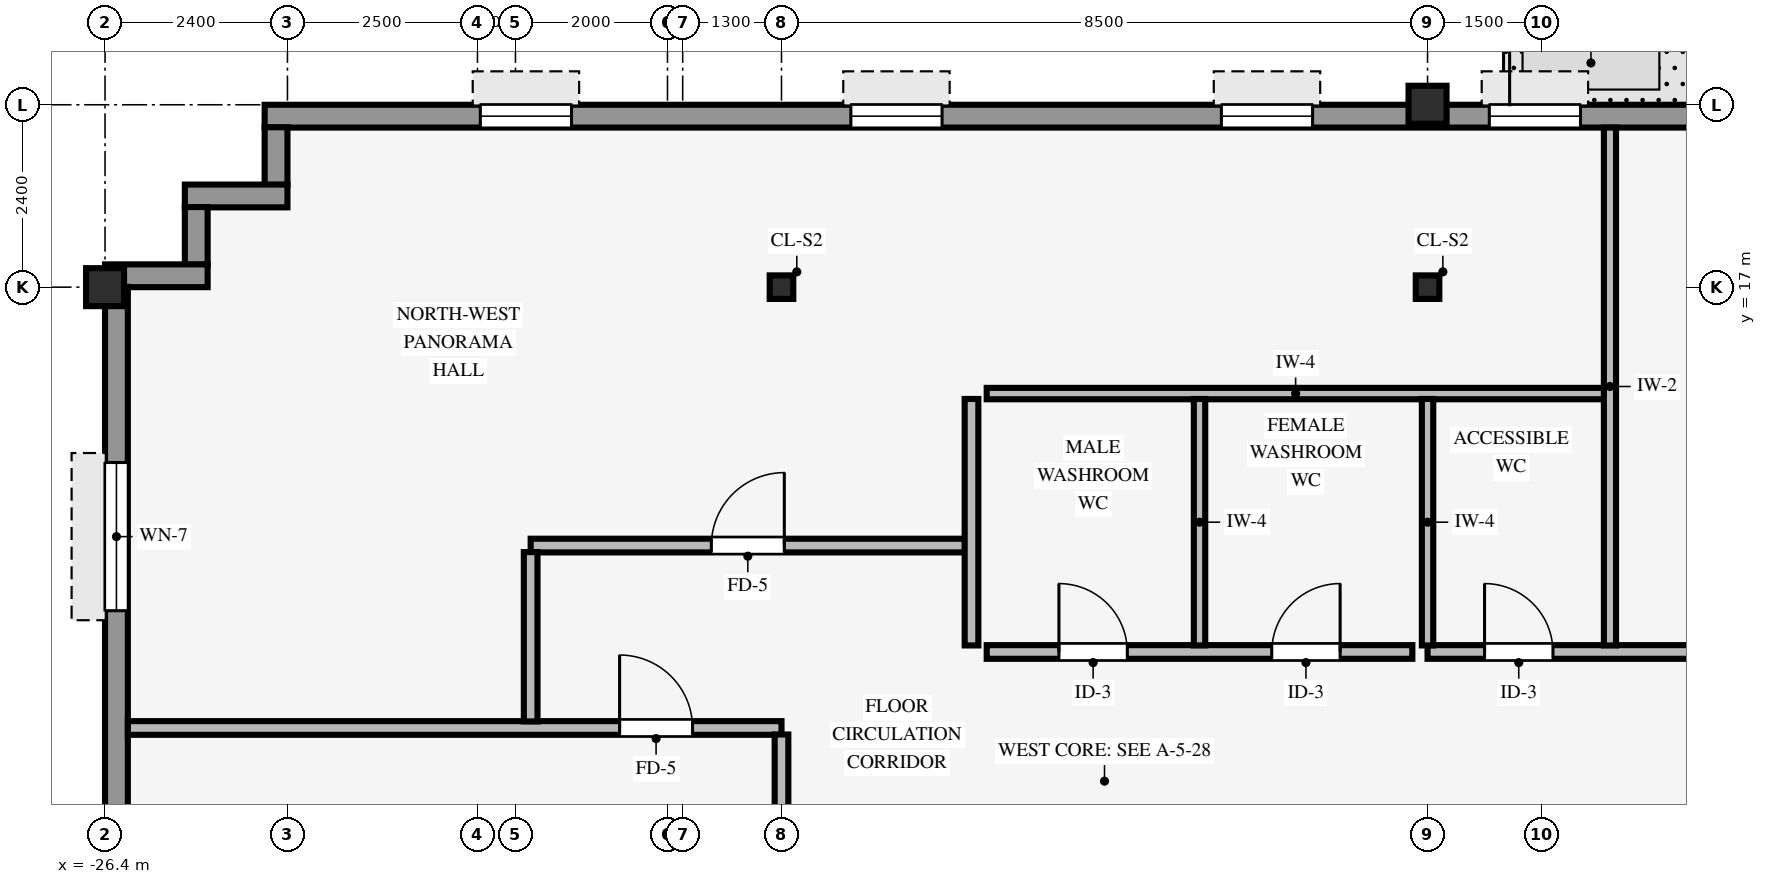
"""IFC4 building model, lengths in metres.
Left out: names, types, materials, properties, quantities, classifications, styles, units other than length and angle.
Written with IfcOpenShell. Run it as: python <this file> out.ifc"""

import sys

from ifc_helpers import new_model, si_unit, direction, frame, frame_2d, origin, origin_2d, place, context, subcontext, project, spatial, rectangle, hollow_rectangle, i_section, extrude, source, transform, mapped, element, fill, save


model = new_model("IFC4")
c1 = context("Model", 3, precision=1e-05, world=origin(), true_north=direction((0.0, 1.0)))
c2 = subcontext(c1, "Body", "Model", "MODEL_VIEW")
j1 = project(units=[si_unit("LENGTHUNIT", "METRE"), si_unit("PLANEANGLEUNIT", "RADIAN")], contexts=[c1])
p1 = place(None, origin())
s1 = spatial("IfcSite", under=j1, at=p1, CompositionType="ELEMENT")
p2 = place(p1, origin())
s2 = spatial("IfcBuilding", under=s1, at=p2, CompositionType="ELEMENT")
p3 = place(p2, frame((0.0, 0.0, 238.35)))
s3 = spatial("IfcBuildingStorey", under=s2, at=p3, CompositionType="ELEMENT", Elevation=238.35)
for number, where, z_axis, x_axis in (
    (1, (-26.4, 17.0, 0.0), (0.0, 0.0, 1.0), (1.0, 0.0, 0.0)),
    (2, (-9.0, 19.4, 0.0), (0.0, 0.0, 1.0), (1.0, 0.0, 0.0)),
):
    element("IfcColumn", number, at=place(p3, frame(where, z_axis=z_axis, x_axis=x_axis)), inside=s3, PredefinedType="COLUMN", context=c2, shape_type="SweptSolid", body=[
        extrude(hollow_rectangle(XDim=0.5, YDim=0.5, WallThickness=0.032, InnerFilletRadius=0.032, OuterFilletRadius=0.064, at=origin_2d()), origin(), (0.0, 0.0, 1.0), 3.37),
    ])
for number, where, z_axis, x_axis in (
    (3, (-17.5, 17.0, 0.0), (0.0, 0.0, 1.0), (1.0, 0.0, 0.0)),
    (4, (-9.0, 17.0, 0.0), (0.0, 0.0, 1.0), (1.0, 0.0, 0.0)),
):
    element("IfcColumn", number, at=place(p3, frame(where, z_axis=z_axis, x_axis=x_axis)), inside=s3, PredefinedType="COLUMN", context=c2, shape_type="SweptSolid", body=[
        extrude(i_section(OverallWidth=0.31, OverallDepth=0.31, WebThickness=0.015, FlangeThickness=0.015, FilletRadius=0.015, at=origin_2d()), origin(), (0.0, 0.0, 1.0), 3.37),
    ])
p4 = place(p3, frame((-24.3, 19.25, 0.0), z_axis=(0.0, 0.0, 1.0), x_axis=(1.0, 0.0, 0.0)))
e5 = element("IfcWall", 5, at=p4, inside=s3, PredefinedType="STANDARD", context=c2, shape_type="SweptSolid", body=[
    extrude(rectangle(XDim=41.0, YDim=0.3, at=frame_2d((20.5, 0.0))), origin(), (0.0, 0.0, 1.0), 2.705),
])
p5 = place(p4, frame((18.9, 0.0, 0.0)))
e6 = element("IfcOpeningElement", 6, at=p5, cuts=e5, PredefinedType="OPENING", context=c2, shape_type="SweptSolid", body=[
    extrude(rectangle(XDim=1.05, YDim=2.1, at=frame_2d((0.525, 1.05))), frame((0.0, 0.16, 0.0), z_axis=(0.0, -1.0, 0.0), x_axis=(1.0, 0.0, 0.0)), (0.0, 0.0, 1.0), 0.32),
])
p6 = place(p4, frame((2.837, 0.0, 0.8)))
e7 = element("IfcOpeningElement", 7, at=p6, cuts=e5, PredefinedType="OPENING", context=c2, shape_type="SweptSolid", body=[
    extrude(rectangle(XDim=1.2, YDim=1.48, at=frame_2d((0.6, 0.74))), frame((0.0, 0.16, 0.0), z_axis=(0.0, -1.0, 0.0), x_axis=(1.0, 0.0, 0.0)), (0.0, 0.0, 1.0), 0.32),
])
p7 = place(p4, frame((7.712, 0.0, 0.8)))
e8 = element("IfcOpeningElement", 8, at=p7, cuts=e5, PredefinedType="OPENING", context=c2, shape_type="SweptSolid", body=[
    extrude(rectangle(XDim=1.2, YDim=1.48, at=frame_2d((0.6, 0.74))), frame((0.0, 0.16, 0.0), z_axis=(0.0, -1.0, 0.0), x_axis=(1.0, 0.0, 0.0)), (0.0, 0.0, 1.0), 0.32),
])
p8 = place(p4, frame((12.587, 0.0, 0.8)))
e9 = element("IfcOpeningElement", 9, at=p8, cuts=e5, PredefinedType="OPENING", context=c2, shape_type="SweptSolid", body=[
    extrude(rectangle(XDim=1.2, YDim=1.48, at=frame_2d((0.6, 0.74))), frame((0.0, 0.16, 0.0), z_axis=(0.0, -1.0, 0.0), x_axis=(1.0, 0.0, 0.0)), (0.0, 0.0, 1.0), 0.32),
])
p9 = place(p4, frame((16.113, 0.0, 0.8)))
e10 = element("IfcOpeningElement", 10, at=p9, cuts=e5, PredefinedType="OPENING", context=c2, shape_type="SweptSolid", body=[
    extrude(rectangle(XDim=1.2, YDim=1.48, at=frame_2d((0.6, 0.74))), frame((0.0, 0.16, 0.0), z_axis=(0.0, -1.0, 0.0), x_axis=(1.0, 0.0, 0.0)), (0.0, 0.0, 1.0), 0.32),
])
p10 = place(p4, frame((21.887, 0.0, 0.8)))
e11 = element("IfcOpeningElement", 11, at=p10, cuts=e5, PredefinedType="OPENING", context=c2, shape_type="SweptSolid", body=[
    extrude(rectangle(XDim=1.2, YDim=1.48, at=frame_2d((0.6, 0.74))), frame((0.0, 0.16, 0.0), z_axis=(0.0, -1.0, 0.0), x_axis=(1.0, 0.0, 0.0)), (0.0, 0.0, 1.0), 0.32),
])
p11 = place(p4, frame((27.212, 0.0, 0.8)))
e12 = element("IfcOpeningElement", 12, at=p11, cuts=e5, PredefinedType="OPENING", context=c2, shape_type="SweptSolid", body=[
    extrude(rectangle(XDim=1.2, YDim=1.48, at=frame_2d((0.6, 0.74))), frame((0.0, 0.16, 0.0), z_axis=(0.0, -1.0, 0.0), x_axis=(1.0, 0.0, 0.0)), (0.0, 0.0, 1.0), 0.32),
])
p12 = place(p4, frame((31.188, 0.0, 0.8)))
e13 = element("IfcOpeningElement", 13, at=p12, cuts=e5, PredefinedType="OPENING", context=c2, shape_type="SweptSolid", body=[
    extrude(rectangle(XDim=1.2, YDim=1.48, at=frame_2d((0.6, 0.74))), frame((0.0, 0.16, 0.0), z_axis=(0.0, -1.0, 0.0), x_axis=(1.0, 0.0, 0.0)), (0.0, 0.0, 1.0), 0.32),
])
p13 = place(p4, frame((36.962, 0.0, 0.8)))
e14 = element("IfcOpeningElement", 14, at=p13, cuts=e5, PredefinedType="OPENING", context=c2, shape_type="SweptSolid", body=[
    extrude(rectangle(XDim=1.2, YDim=1.48, at=frame_2d((0.6, 0.74))), frame((0.0, 0.16, 0.0), z_axis=(0.0, -1.0, 0.0), x_axis=(1.0, 0.0, 0.0)), (0.0, 0.0, 1.0), 0.32),
])
p14 = place(p3, frame((-24.15, 18.346, 0.0), z_axis=(0.0, 0.0, 1.0), x_axis=(0.0, 1.0, 0.0)))
e15 = element("IfcWall", 15, at=p14, inside=s3, PredefinedType="STANDARD", context=c2, shape_type="SweptSolid", body=[
    extrude(rectangle(XDim=0.758, YDim=0.3, at=frame_2d((0.379, 0.0))), origin(), (0.0, 0.0, 1.0), 2.892),
])
p15 = place(p3, frame((-25.35, 18.2, 0.0), z_axis=(0.0, 0.0, 1.0), x_axis=(1.0, 0.0, 0.0)))
e16 = element("IfcWall", 16, at=p15, inside=s3, PredefinedType="STANDARD", context=c2, shape_type="SweptSolid", body=[
    extrude(rectangle(XDim=1.35, YDim=0.3, at=frame_2d((0.675, 0.0))), origin(), (0.0, 0.0, 1.0), 2.892),
])
p16 = place(p3, frame((-25.2, 17.296, 0.0), z_axis=(0.0, 0.0, 1.0), x_axis=(0.0, 1.0, 0.0)))
e17 = element("IfcWall", 17, at=p16, inside=s3, PredefinedType="STANDARD", context=c2, shape_type="SweptSolid", body=[
    extrude(rectangle(XDim=0.758, YDim=0.3, at=frame_2d((0.379, 0.0))), origin(), (0.0, 0.0, 1.0), 2.892),
])
p17 = place(p3, frame((-26.4, 17.15, 0.0), z_axis=(0.0, 0.0, 1.0), x_axis=(1.0, 0.0, 0.0)))
e18 = element("IfcWall", 18, at=p17, inside=s3, PredefinedType="STANDARD", context=c2, shape_type="SweptSolid", body=[
    extrude(rectangle(XDim=1.35, YDim=0.3, at=frame_2d((0.675, 0.0))), origin(), (0.0, 0.0, 1.0), 2.892),
])
p18 = place(p3, frame((-26.25, -17.004, 0.0), z_axis=(0.0, 0.0, 1.0), x_axis=(0.0, 1.0, 0.0)))
e19 = element("IfcWall", 19, at=p18, inside=s3, PredefinedType="STANDARD", context=c2, shape_type="SweptSolid", body=[
    extrude(rectangle(XDim=34.008, YDim=0.3, at=frame_2d((17.004, 0.0))), origin(), (0.0, 0.0, 1.0), 2.705),
])
p19 = place(p18, frame((2.311, 0.0, 0.8)))
e20 = element("IfcOpeningElement", 20, at=p19, cuts=e19, PredefinedType="OPENING", context=c2, shape_type="SweptSolid", body=[
    extrude(rectangle(XDim=1.95, YDim=1.48, at=frame_2d((0.975, 0.74))), frame((0.0, 0.16, 0.0), z_axis=(0.0, -1.0, 0.0), x_axis=(1.0, 0.0, 0.0)), (0.0, 0.0, 1.0), 0.32),
])
p20 = place(p18, frame((8.234, 0.0, 0.8)))
e21 = element("IfcOpeningElement", 21, at=p20, cuts=e19, PredefinedType="OPENING", context=c2, shape_type="SweptSolid", body=[
    extrude(rectangle(XDim=1.95, YDim=1.48, at=frame_2d((0.975, 0.74))), frame((0.0, 0.16, 0.0), z_axis=(0.0, -1.0, 0.0), x_axis=(1.0, 0.0, 0.0)), (0.0, 0.0, 1.0), 0.32),
])
p21 = place(p18, frame((11.456, 0.0, 0.8)))
e22 = element("IfcOpeningElement", 22, at=p21, cuts=e19, PredefinedType="OPENING", context=c2, shape_type="SweptSolid", body=[
    extrude(rectangle(XDim=1.95, YDim=1.48, at=frame_2d((0.975, 0.74))), frame((0.0, 0.16, 0.0), z_axis=(0.0, -1.0, 0.0), x_axis=(1.0, 0.0, 0.0)), (0.0, 0.0, 1.0), 0.32),
])
p22 = place(p18, frame((20.602, 0.0, 0.8)))
e23 = element("IfcOpeningElement", 23, at=p22, cuts=e19, PredefinedType="OPENING", context=c2, shape_type="SweptSolid", body=[
    extrude(rectangle(XDim=1.95, YDim=1.48, at=frame_2d((0.975, 0.74))), frame((0.0, 0.16, 0.0), z_axis=(0.0, -1.0, 0.0), x_axis=(1.0, 0.0, 0.0)), (0.0, 0.0, 1.0), 0.32),
])
p23 = place(p18, frame((23.824, 0.0, 0.8)))
e24 = element("IfcOpeningElement", 24, at=p23, cuts=e19, PredefinedType="OPENING", context=c2, shape_type="SweptSolid", body=[
    extrude(rectangle(XDim=1.95, YDim=1.48, at=frame_2d((0.975, 0.74))), frame((0.0, 0.16, 0.0), z_axis=(0.0, -1.0, 0.0), x_axis=(1.0, 0.0, 0.0)), (0.0, 0.0, 1.0), 0.32),
])
p24 = place(p18, frame((29.747, 0.0, 0.8)))
e25 = element("IfcOpeningElement", 25, at=p24, cuts=e19, PredefinedType="OPENING", context=c2, shape_type="SweptSolid", body=[
    extrude(rectangle(XDim=1.95, YDim=1.48, at=frame_2d((0.975, 0.74))), frame((0.0, 0.16, 0.0), z_axis=(0.0, -1.0, 0.0), x_axis=(1.0, 0.0, 0.0)), (0.0, 0.0, 1.0), 0.32),
])
p25 = place(p3, frame((-26.1, 11.2, 0.0), z_axis=(0.0, 0.0, 1.0), x_axis=(1.0, 0.0, 0.0)))
e26 = element("IfcWall", 26, at=p25, inside=s3, PredefinedType="PARTITIONING", context=c2, shape_type="SweptSolid", body=[
    extrude(rectangle(XDim=8.6, YDim=0.18, at=frame_2d((4.3, 0.0))), origin(), (0.0, 0.0, 1.0), 3.36),
])
p26 = place(p25, frame((6.47, 0.0, 0.0)))
e27 = element("IfcOpeningElement", 27, at=p26, cuts=e26, PredefinedType="OPENING", context=c2, shape_type="SweptSolid", body=[
    extrude(rectangle(XDim=0.96, YDim=2.1, at=frame_2d((0.48, 1.05))), frame((0.0, 0.1, 0.0), z_axis=(0.0, -1.0, 0.0), x_axis=(1.0, 0.0, 0.0)), (0.0, 0.0, 1.0), 0.2),
])
p27 = place(p3, frame((-14.8, 12.2, 0.0), z_axis=(0.0, 0.0, 1.0), x_axis=(1.0, 0.0, 0.0)))
e28 = element("IfcWall", 28, at=p27, inside=s3, PredefinedType="PARTITIONING", context=c2, shape_type="SweptSolid", body=[
    extrude(rectangle(XDim=5.6, YDim=0.18, at=frame_2d((2.8, 0.0))), origin(), (0.0, 0.0, 1.0), 3.36),
])
p28 = place(p27, frame((0.95, 0.0, 0.0)))
e29 = element("IfcOpeningElement", 29, at=p28, cuts=e28, PredefinedType="OPENING", context=c2, shape_type="SweptSolid", body=[
    extrude(rectangle(XDim=0.9, YDim=2.1, at=frame_2d((0.45, 1.05))), frame((0.0, 0.1, 0.0), z_axis=(0.0, -1.0, 0.0), x_axis=(1.0, 0.0, 0.0)), (0.0, 0.0, 1.0), 0.2),
])
p29 = place(p27, frame((3.75, 0.0, 0.0)))
e30 = element("IfcOpeningElement", 30, at=p29, cuts=e28, PredefinedType="OPENING", context=c2, shape_type="SweptSolid", body=[
    extrude(rectangle(XDim=0.9, YDim=2.1, at=frame_2d((0.45, 1.05))), frame((0.0, 0.1, 0.0), z_axis=(0.0, -1.0, 0.0), x_axis=(1.0, 0.0, 0.0)), (0.0, 0.0, 1.0), 0.2),
])
p30 = place(p3, frame((-9.0, 12.2, 0.0), z_axis=(0.0, 0.0, 1.0), x_axis=(1.0, 0.0, 0.0)))
e31 = element("IfcWall", 31, at=p30, inside=s3, PredefinedType="PARTITIONING", context=c2, shape_type="SweptSolid", body=[
    extrude(rectangle(XDim=24.8, YDim=0.18, at=frame_2d((12.4, 0.0))), origin(), (0.0, 0.0, 1.0), 3.36),
])
p31 = place(p30, frame((11.42, 0.0, 0.0)))
e32 = element("IfcOpeningElement", 32, at=p31, cuts=e31, PredefinedType="OPENING", context=c2, shape_type="SweptSolid", body=[
    extrude(rectangle(XDim=0.96, YDim=2.1, at=frame_2d((0.48, 1.05))), frame((0.0, 0.1, 0.0), z_axis=(0.0, -1.0, 0.0), x_axis=(1.0, 0.0, 0.0)), (0.0, 0.0, 1.0), 0.2),
])
p32 = place(p30, frame((20.92, 0.0, 0.0)))
e33 = element("IfcOpeningElement", 33, at=p32, cuts=e31, PredefinedType="OPENING", context=c2, shape_type="SweptSolid", body=[
    extrude(rectangle(XDim=0.96, YDim=2.1, at=frame_2d((0.48, 1.05))), frame((0.0, 0.1, 0.0), z_axis=(0.0, -1.0, 0.0), x_axis=(1.0, 0.0, 0.0)), (0.0, 0.0, 1.0), 0.2),
])
p33 = place(p30, frame((4.82, 0.0, 0.0)))
e34 = element("IfcOpeningElement", 34, at=p33, cuts=e31, PredefinedType="OPENING", context=c2, shape_type="SweptSolid", body=[
    extrude(rectangle(XDim=0.96, YDim=2.1, at=frame_2d((0.48, 1.05))), frame((0.0, 0.1, 0.0), z_axis=(0.0, -1.0, 0.0), x_axis=(1.0, 0.0, 0.0)), (0.0, 0.0, 1.0), 0.2),
])
p34 = place(p30, frame((0.75, 0.0, 0.0)))
e35 = element("IfcOpeningElement", 35, at=p34, cuts=e31, PredefinedType="OPENING", context=c2, shape_type="SweptSolid", body=[
    extrude(rectangle(XDim=0.9, YDim=2.1, at=frame_2d((0.45, 1.05))), frame((0.0, 0.1, 0.0), z_axis=(0.0, -1.0, 0.0), x_axis=(1.0, 0.0, 0.0)), (0.0, 0.0, 1.0), 0.2),
])
p35 = place(p3, frame((-20.8, 13.6, 0.0), z_axis=(0.0, 0.0, 1.0), x_axis=(1.0, 0.0, 0.0)))
e36 = element("IfcWall", 36, at=p35, inside=s3, PredefinedType="PARTITIONING", context=c2, shape_type="SweptSolid", body=[
    extrude(rectangle(XDim=5.714, YDim=0.18, at=frame_2d((2.857, 0.0))), origin(), (0.0, 0.0, 1.0), 3.049),
])
p36 = place(p35, frame((2.377, 0.0, 0.0)))
e37 = element("IfcOpeningElement", 37, at=p36, cuts=e36, PredefinedType="OPENING", context=c2, shape_type="SweptSolid", body=[
    extrude(rectangle(XDim=0.96, YDim=2.1, at=frame_2d((0.48, 1.05))), frame((0.0, 0.1, 0.0), z_axis=(0.0, -1.0, 0.0), x_axis=(1.0, 0.0, 0.0)), (0.0, 0.0, 1.0), 0.2),
])
p37 = place(p3, frame((-14.8, 15.6, 0.0), z_axis=(0.0, 0.0, 1.0), x_axis=(1.0, 0.0, 0.0)))
e38 = element("IfcWall", 38, at=p37, inside=s3, PredefinedType="PARTITIONING", context=c2, shape_type="SweptSolid", body=[
    extrude(rectangle(XDim=8.129, YDim=0.15, at=frame_2d((4.064, 0.0))), origin(), (0.0, 0.0, 1.0), 3.36),
])
p38 = place(p3, frame((-20.8, 11.286, 0.0), z_axis=(0.0, 0.0, 1.0), x_axis=(0.0, 1.0, 0.0)))
e39 = element("IfcWall", 39, at=p38, inside=s3, PredefinedType="PARTITIONING", context=c2, shape_type="SweptSolid", body=[
    extrude(rectangle(XDim=2.228, YDim=0.18, at=frame_2d((1.114, 0.0))), origin(), (0.0, 0.0, 1.0), 3.36),
])
p39 = place(p3, frame((-17.5, 9.996, 0.0), z_axis=(0.0, 0.0, 1.0), x_axis=(0.0, 1.0, 0.0)))
e40 = element("IfcWall", 40, at=p39, inside=s3, PredefinedType="PARTITIONING", context=c2, shape_type="SweptSolid", body=[
    extrude(rectangle(XDim=1.118, YDim=0.18, at=frame_2d((0.559, 0.0))), origin(), (0.0, 0.0, 1.0), 2.892),
])
p40 = place(p3, frame((-15.0, 12.286, 0.0), z_axis=(0.0, 0.0, 1.0), x_axis=(0.0, 1.0, 0.0)))
e41 = element("IfcWall", 41, at=p40, inside=s3, PredefinedType="PARTITIONING", context=c2, shape_type="SweptSolid", body=[
    extrude(rectangle(XDim=3.243, YDim=0.18, at=frame_2d((1.622, 0.0))), origin(), (0.0, 0.0, 1.0), 3.36),
])
p41 = place(p3, frame((-12.0, 12.286, 0.0), z_axis=(0.0, 0.0, 1.0), x_axis=(0.0, 1.0, 0.0)))
e42 = element("IfcWall", 42, at=p41, inside=s3, PredefinedType="PARTITIONING", context=c2, shape_type="SweptSolid", body=[
    extrude(rectangle(XDim=3.243, YDim=0.15, at=frame_2d((1.622, 0.0))), origin(), (0.0, 0.0, 1.0), 3.36),
])
p42 = place(p3, frame((-9.0, 12.286, 0.0), z_axis=(0.0, 0.0, 1.0), x_axis=(0.0, 1.0, 0.0)))
e43 = element("IfcWall", 43, at=p42, inside=s3, PredefinedType="PARTITIONING", context=c2, shape_type="SweptSolid", body=[
    extrude(rectangle(XDim=3.243, YDim=0.15, at=frame_2d((1.622, 0.0))), origin(), (0.0, 0.0, 1.0), 2.892),
])
p43 = place(p3, frame((-6.6, 12.286, 0.0), z_axis=(0.0, 0.0, 1.0), x_axis=(0.0, 1.0, 0.0)))
e44 = element("IfcWall", 44, at=p43, inside=s3, PredefinedType="PARTITIONING", context=c2, shape_type="SweptSolid", body=[
    extrude(rectangle(XDim=6.814, YDim=0.16, at=frame_2d((3.407, 0.0))), origin(), (0.0, 0.0, 1.0), 3.36),
])
m1 = source(origin(), c2, "Body", "SweptSolid", [
    extrude(rectangle(XDim=1.2, YDim=1.48, at=frame_2d((0.6, 0.74))), frame((0.0, 0.03, 0.0), z_axis=(0.0, -1.0, 0.0), x_axis=(1.0, 0.0, 0.0)), (0.0, 0.0, 1.0), 0.06),
])
p44 = place(p6, origin())
e45 = element("IfcWindow", 45, at=p44, inside=s3, PartitioningType="SINGLE_PANEL", PredefinedType="WINDOW", context=c2, shape_type="MappedRepresentation", body=[
    mapped(m1, transform((0.0, 0.0, 0.0), scale=1.0)),
])
fill(e7, e45)
p45 = place(p7, origin())
e46 = element("IfcWindow", 46, at=p45, inside=s3, PartitioningType="SINGLE_PANEL", PredefinedType="WINDOW", context=c2, shape_type="MappedRepresentation", body=[
    mapped(m1, transform((0.0, 0.0, 0.0), scale=1.0)),
])
fill(e8, e46)
p46 = place(p8, origin())
e47 = element("IfcWindow", 47, at=p46, inside=s3, PartitioningType="SINGLE_PANEL", PredefinedType="WINDOW", context=c2, shape_type="MappedRepresentation", body=[
    mapped(m1, transform((0.0, 0.0, 0.0), scale=1.0)),
])
fill(e9, e47)
p47 = place(p9, origin())
e48 = element("IfcWindow", 48, at=p47, inside=s3, PartitioningType="SINGLE_PANEL", PredefinedType="WINDOW", context=c2, shape_type="MappedRepresentation", body=[
    mapped(m1, transform((0.0, 0.0, 0.0), scale=1.0)),
])
fill(e10, e48)
m2 = source(origin(), c2, "Body", "SweptSolid", [
    extrude(rectangle(XDim=1.95, YDim=1.48, at=frame_2d((0.975, 0.74))), frame((0.0, 0.03, 0.0), z_axis=(0.0, -1.0, 0.0), x_axis=(1.0, 0.0, 0.0)), (0.0, 0.0, 1.0), 0.06),
])
p48 = place(p24, origin())
e49 = element("IfcWindow", 49, at=p48, inside=s3, PartitioningType="SINGLE_PANEL", PredefinedType="WINDOW", context=c2, shape_type="MappedRepresentation", body=[
    mapped(m2, transform((0.0, 0.0, 0.0), scale=1.0)),
])
fill(e25, e49)
m3 = source(origin(), c2, "Body", "SweptSolid", [
    extrude(rectangle(XDim=0.96, YDim=2.1, at=frame_2d((0.48, 1.05))), frame((0.0, 0.025, 0.0), z_axis=(0.0, -1.0, 0.0), x_axis=(1.0, 0.0, 0.0)), (0.0, 0.0, 1.0), 0.05),
])
p49 = place(p36, origin())
e50 = element("IfcDoor", 50, at=p49, inside=s3, OperationType="SINGLE_SWING_RIGHT", PredefinedType="DOOR", context=c2, shape_type="MappedRepresentation", body=[
    mapped(m3, transform((0.0, 0.0, 0.0), scale=1.0)),
])
fill(e37, e50)
p50 = place(p26, origin())
e51 = element("IfcDoor", 51, at=p50, inside=s3, OperationType="SINGLE_SWING_LEFT", PredefinedType="DOOR", context=c2, shape_type="MappedRepresentation", body=[
    mapped(m3, transform((0.0, 0.0, 0.0), scale=1.0)),
])
fill(e27, e51)
m4 = source(origin(), c2, "Body", "SweptSolid", [
    extrude(rectangle(XDim=0.9, YDim=2.1, at=frame_2d((0.45, 1.05))), frame((0.0, 0.025, 0.0), z_axis=(0.0, -1.0, 0.0), x_axis=(1.0, 0.0, 0.0)), (0.0, 0.0, 1.0), 0.05),
])
p51 = place(p28, origin())
e52 = element("IfcDoor", 52, at=p51, inside=s3, OperationType="SINGLE_SWING_LEFT", PredefinedType="DOOR", context=c2, shape_type="MappedRepresentation", body=[
    mapped(m4, transform((0.0, 0.0, 0.0), scale=1.0)),
])
fill(e29, e52)
p52 = place(p29, origin())
e53 = element("IfcDoor", 53, at=p52, inside=s3, OperationType="SINGLE_SWING_RIGHT", PredefinedType="DOOR", context=c2, shape_type="MappedRepresentation", body=[
    mapped(m4, transform((0.0, 0.0, 0.0), scale=1.0)),
])
fill(e30, e53)
p53 = place(p34, origin())
e54 = element("IfcDoor", 54, at=p53, inside=s3, OperationType="SINGLE_SWING_LEFT", PredefinedType="DOOR", context=c2, shape_type="MappedRepresentation", body=[
    mapped(m4, transform((0.0, 0.0, 0.0), scale=1.0)),
])
fill(e35, e54)
save(model, sys.argv[1])
